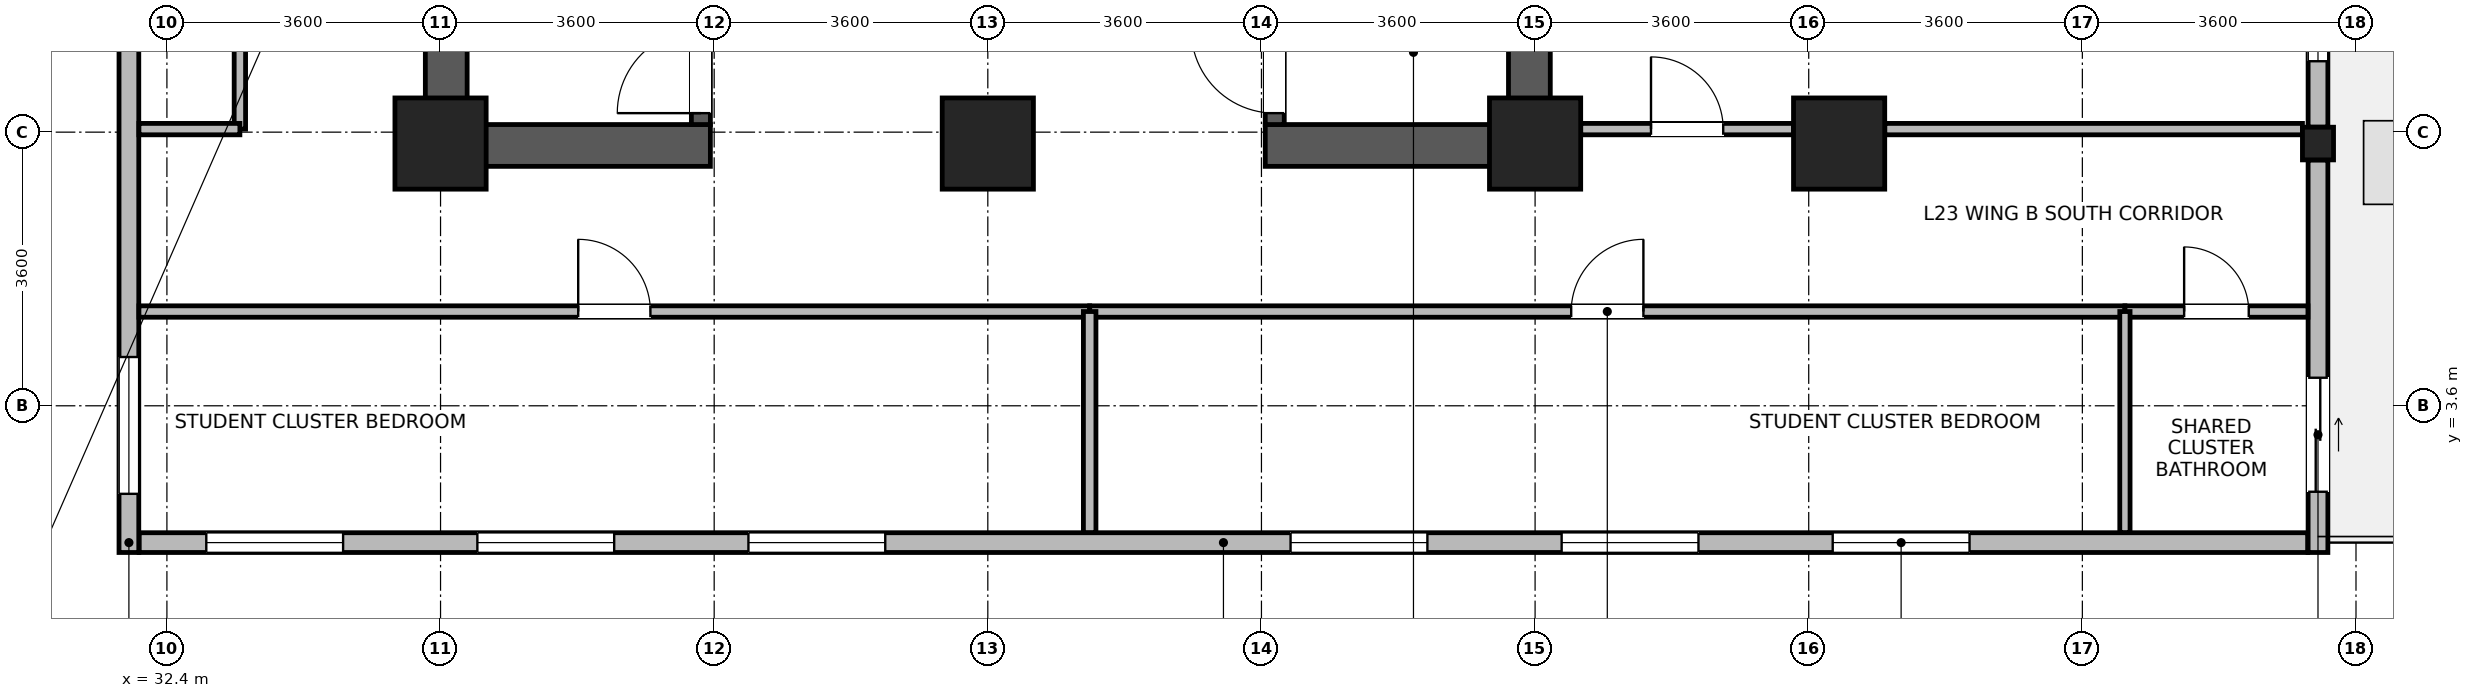
"""IFC4 building model, lengths in metres.
Left out: names, types, materials, properties, quantities, classifications, styles, units other than length and angle.
Written with IfcOpenShell. Run it as: python <this file> out.ifc"""

import sys

from ifc_helpers import new_model, si_unit, direction, frame, frame_2d, origin, origin_2d, place, context, subcontext, project, spatial, rectangle, i_section, extrude, source, transform, mapped, element, fill, save


model = new_model("IFC4")
c1 = context("Model", 3, precision=1e-05, world=origin(), true_north=direction((0.0, 1.0)))
c2 = subcontext(c1, "Body", "Model", "MODEL_VIEW")
j1 = project(units=[si_unit("LENGTHUNIT", "METRE"), si_unit("PLANEANGLEUNIT", "RADIAN")], contexts=[c1])
p1 = place(None, origin())
s1 = spatial("IfcSite", under=j1, at=p1, CompositionType="ELEMENT")
p2 = place(p1, origin())
s2 = spatial("IfcBuilding", under=s1, at=p2, CompositionType="ELEMENT")
p3 = place(p2, frame((0.0, 0.0, 93.4)))
s3 = spatial("IfcBuildingStorey", under=s2, at=p3, CompositionType="ELEMENT", Elevation=93.4)
for number, where, z_axis, x_axis in (
    (1, (36.075, 6.75, 0.0), (0.0, 0.0, 1.0), (0.0, 1.0, 0.0)),
    (2, (50.325, 6.75, 0.0), (0.0, 0.0, 1.0), (0.0, 1.0, 0.0)),
):
    element("IfcWall", number, at=place(p3, frame(where, z_axis=z_axis, x_axis=x_axis)), inside=s3, PredefinedType="SHEAR", context=c2, shape_type="SweptSolid", body=[
        extrude(rectangle(XDim=8.1, YDim=0.55, at=frame_2d((4.05, 0.0))), origin(), (0.0, 0.0, 1.0), 3.45),
    ])
for number, where, z_axis, x_axis in (
    (3, (36.35, 7.025, 0.0), (0.0, 0.0, 1.0), (1.0, 0.0, 0.0)),
    (4, (46.85, 7.025, 0.0), (0.0, 0.0, 1.0), (1.0, 0.0, 0.0)),
):
    element("IfcWall", number, at=place(p3, frame(where, z_axis=z_axis, x_axis=x_axis)), inside=s3, PredefinedType="SHEAR", context=c2, shape_type="SweptSolid", body=[
        extrude(rectangle(XDim=3.2, YDim=0.55, at=frame_2d((1.6, 0.0))), origin(), (0.0, 0.0, 1.0), 3.45),
    ])
p4 = place(p3, frame((39.425, 7.3, 0.0), z_axis=(0.0, 0.0, 1.0), x_axis=(0.0, 1.0, 0.0)))
e5 = element("IfcWall", 5, at=p4, inside=s3, PredefinedType="SHEAR", context=c2, shape_type="SweptSolid", body=[
    extrude(rectangle(XDim=7.0, YDim=0.25, at=frame_2d((3.5, 0.0))), origin(), (0.0, 0.0, 1.0), 3.45),
])
p5 = place(p4, frame((0.15, 0.0, 0.0)))
e6 = element("IfcOpeningElement", 6, at=p5, cuts=e5, PredefinedType="OPENING", context=c2, shape_type="SweptSolid", body=[
    extrude(rectangle(XDim=1.1, YDim=2.08, at=frame_2d((0.55, 1.04))), frame((0.0, 0.135, 0.0), z_axis=(0.0, -1.0, 0.0), x_axis=(1.0, 0.0, 0.0)), (0.0, 0.0, 1.0), 0.27),
])
p6 = place(p3, frame((46.975, 7.3, 0.0), z_axis=(0.0, 0.0, 1.0), x_axis=(0.0, 1.0, 0.0)))
e7 = element("IfcWall", 7, at=p6, inside=s3, PredefinedType="SHEAR", context=c2, shape_type="SweptSolid", body=[
    extrude(rectangle(XDim=7.0, YDim=0.25, at=frame_2d((3.5, 0.0))), origin(), (0.0, 0.0, 1.0), 3.45),
])
p7 = place(p6, frame((0.15, 0.0, 0.0)))
e8 = element("IfcOpeningElement", 8, at=p7, cuts=e7, PredefinedType="OPENING", context=c2, shape_type="SweptSolid", body=[
    extrude(rectangle(XDim=1.1, YDim=2.08, at=frame_2d((0.55, 1.04))), frame((0.0, 0.135, 0.0), z_axis=(0.0, -1.0, 0.0), x_axis=(1.0, 0.0, 0.0)), (0.0, 0.0, 1.0), 0.27),
])
m1 = source(origin(), c2, "Body", "SweptSolid", [
    extrude(rectangle(XDim=1.2, YDim=1.2, at=origin_2d()), origin(), (0.0, 0.0, 1.0), 3.7),
])
for number, where, z_axis, x_axis in (
    (9, (36.0, 7.05, 0.0), (0.0, 0.0, 1.0), (1.0, 0.0, 0.0)),
    (10, (43.2, 7.05, 0.0), (0.0, 0.0, 1.0), (1.0, 0.0, 0.0)),
    (11, (50.4, 7.05, 0.0), (0.0, 0.0, 1.0), (1.0, 0.0, 0.0)),
    (12, (54.4, 7.05, 0.0), (0.0, 0.0, 1.0), (1.0, 0.0, 0.0)),
):
    element("IfcColumn", number, at=place(p3, frame(where, z_axis=z_axis, x_axis=x_axis)), inside=s3, PredefinedType="COLUMN", context=c2, shape_type="MappedRepresentation", body=[
        mapped(m1, transform((0.0, 0.0, 0.0), x_axis=(1.0, 0.0, 0.0), y_axis=(0.0, 1.0, 0.0), z_axis=(0.0, 0.0, 1.0), scale=1.0)),
    ])
m2 = source(origin(), c2, "Body", "SweptSolid", [
    extrude(i_section(OverallWidth=0.409, OverallDepth=0.43, WebThickness=0.024, FlangeThickness=0.033, FilletRadius=0.015, at=origin_2d()), origin(), (0.0, 0.0, 1.0), 3.7),
])
p8 = place(p3, frame((60.7, 7.05, 0.0), z_axis=(0.0, 0.0, 1.0), x_axis=(1.0, 0.0, 0.0)))
e13 = element("IfcColumn", 13, at=p8, inside=s3, PredefinedType="COLUMN", context=c2, shape_type="MappedRepresentation", body=[
    mapped(m2, transform((0.0, 0.0, 0.0), x_axis=(1.0, 0.0, 0.0), y_axis=(0.0, 1.0, 0.0), z_axis=(0.0, 0.0, 1.0), scale=1.0)),
])
p9 = place(p3, frame((60.565, 1.8, 0.0), z_axis=(0.0, 0.0, 1.0), x_axis=(-1.0, 0.0, 0.0)))
e14 = element("IfcWall", 14, at=p9, inside=s3, PredefinedType="STANDARD", context=c2, shape_type="SweptSolid", body=[
    extrude(rectangle(XDim=28.53, YDim=0.26, at=frame_2d((14.265, 0.0))), origin(), (0.0, 0.0, 1.0), 3.43),
])
p10 = place(p9, frame((4.449, 0.0, 0.85)))
e15 = element("IfcOpeningElement", 15, at=p10, cuts=e14, PredefinedType="OPENING", context=c2, shape_type="SweptSolid", body=[
    extrude(rectangle(XDim=1.8, YDim=1.85, at=frame_2d((0.9, 0.925))), frame((0.0, 0.14, 0.0), z_axis=(0.0, -1.0, 0.0), x_axis=(1.0, 0.0, 0.0)), (0.0, 0.0, 1.0), 0.28),
])
p11 = place(p9, frame((8.016, 0.0, 0.85)))
e16 = element("IfcOpeningElement", 16, at=p11, cuts=e14, PredefinedType="OPENING", context=c2, shape_type="SweptSolid", body=[
    extrude(rectangle(XDim=1.8, YDim=1.85, at=frame_2d((0.9, 0.925))), frame((0.0, 0.14, 0.0), z_axis=(0.0, -1.0, 0.0), x_axis=(1.0, 0.0, 0.0)), (0.0, 0.0, 1.0), 0.28),
])
p12 = place(p9, frame((11.582, 0.0, 0.85)))
e17 = element("IfcOpeningElement", 17, at=p12, cuts=e14, PredefinedType="OPENING", context=c2, shape_type="SweptSolid", body=[
    extrude(rectangle(XDim=1.8, YDim=1.85, at=frame_2d((0.9, 0.925))), frame((0.0, 0.14, 0.0), z_axis=(0.0, -1.0, 0.0), x_axis=(1.0, 0.0, 0.0)), (0.0, 0.0, 1.0), 0.28),
])
p13 = place(p9, frame((18.714, 0.0, 0.85)))
e18 = element("IfcOpeningElement", 18, at=p13, cuts=e14, PredefinedType="OPENING", context=c2, shape_type="SweptSolid", body=[
    extrude(rectangle(XDim=1.8, YDim=1.85, at=frame_2d((0.9, 0.925))), frame((0.0, 0.14, 0.0), z_axis=(0.0, -1.0, 0.0), x_axis=(1.0, 0.0, 0.0)), (0.0, 0.0, 1.0), 0.28),
])
p14 = place(p9, frame((22.281, 0.0, 0.85)))
e19 = element("IfcOpeningElement", 19, at=p14, cuts=e14, PredefinedType="OPENING", context=c2, shape_type="SweptSolid", body=[
    extrude(rectangle(XDim=1.8, YDim=1.85, at=frame_2d((0.9, 0.925))), frame((0.0, 0.14, 0.0), z_axis=(0.0, -1.0, 0.0), x_axis=(1.0, 0.0, 0.0)), (0.0, 0.0, 1.0), 0.28),
])
p15 = place(p9, frame((25.847, 0.0, 0.85)))
e20 = element("IfcOpeningElement", 20, at=p15, cuts=e14, PredefinedType="OPENING", context=c2, shape_type="SweptSolid", body=[
    extrude(rectangle(XDim=1.8, YDim=1.85, at=frame_2d((0.9, 0.925))), frame((0.0, 0.14, 0.0), z_axis=(0.0, -1.0, 0.0), x_axis=(1.0, 0.0, 0.0)), (0.0, 0.0, 1.0), 0.28),
])
p16 = place(p3, frame((60.7, 6.834, 0.0), z_axis=(0.0, 0.0, 1.0), x_axis=(0.0, -1.0, 0.0)))
e21 = element("IfcWall", 21, at=p16, inside=s3, PredefinedType="STANDARD", context=c2, shape_type="SweptSolid", body=[
    extrude(rectangle(XDim=5.164, YDim=0.26, at=frame_2d((2.582, 0.0))), origin(), (0.0, 0.0, 1.0), 3.43),
])
p17 = place(p16, frame((2.865, 0.0, 0.0)))
e22 = element("IfcOpeningElement", 22, at=p17, cuts=e21, PredefinedType="OPENING", context=c2, shape_type="SweptSolid", body=[
    extrude(rectangle(XDim=1.5, YDim=2.15, at=frame_2d((0.75, 1.075))), frame((0.0, 0.14, 0.0), z_axis=(0.0, -1.0, 0.0), x_axis=(1.0, 0.0, 0.0)), (0.0, 0.0, 1.0), 0.28),
])
p18 = place(p3, frame((60.7, 14.334, 0.0), z_axis=(0.0, 0.0, 1.0), x_axis=(0.0, -1.0, 0.0)))
e23 = element("IfcWall", 23, at=p18, inside=s3, PredefinedType="STANDARD", context=c2, shape_type="SweptSolid", body=[
    extrude(rectangle(XDim=7.068, YDim=0.26, at=frame_2d((3.534, 0.0))), origin(), (0.0, 0.0, 1.0), 2.93),
])
p19 = place(p18, frame((0.867, 0.0, 0.85)))
e24 = element("IfcOpeningElement", 24, at=p19, cuts=e23, PredefinedType="OPENING", context=c2, shape_type="SweptSolid", body=[
    extrude(rectangle(XDim=1.8, YDim=1.85, at=frame_2d((0.9, 0.925))), frame((0.0, 0.14, 0.0), z_axis=(0.0, -1.0, 0.0), x_axis=(1.0, 0.0, 0.0)), (0.0, 0.0, 1.0), 0.28),
])
p20 = place(p18, frame((4.401, 0.0, 0.85)))
e25 = element("IfcOpeningElement", 25, at=p20, cuts=e23, PredefinedType="OPENING", context=c2, shape_type="SweptSolid", body=[
    extrude(rectangle(XDim=1.8, YDim=1.85, at=frame_2d((0.9, 0.925))), frame((0.0, 0.14, 0.0), z_axis=(0.0, -1.0, 0.0), x_axis=(1.0, 0.0, 0.0)), (0.0, 0.0, 1.0), 0.28),
])
p21 = place(p3, frame((31.9, 1.67, 0.0), z_axis=(0.0, 0.0, 1.0), x_axis=(0.0, 1.0, 0.0)))
e26 = element("IfcWall", 26, at=p21, inside=s3, PredefinedType="STANDARD", context=c2, shape_type="SweptSolid", body=[
    extrude(rectangle(XDim=20.06, YDim=0.26, at=frame_2d((10.03, 0.0))), origin(), (0.0, 0.0, 1.0), 3.43),
])
p22 = place(p21, frame((0.772, 0.0, 0.85)))
e27 = element("IfcOpeningElement", 27, at=p22, cuts=e26, PredefinedType="OPENING", context=c2, shape_type="SweptSolid", body=[
    extrude(rectangle(XDim=1.8, YDim=1.85, at=frame_2d((0.9, 0.925))), frame((0.0, 0.14, 0.0), z_axis=(0.0, -1.0, 0.0), x_axis=(1.0, 0.0, 0.0)), (0.0, 0.0, 1.0), 0.28),
])
p23 = place(p21, frame((7.458, 0.0, 0.85)))
e28 = element("IfcOpeningElement", 28, at=p23, cuts=e26, PredefinedType="OPENING", context=c2, shape_type="SweptSolid", body=[
    extrude(rectangle(XDim=1.8, YDim=1.85, at=frame_2d((0.9, 0.925))), frame((0.0, 0.14, 0.0), z_axis=(0.0, -1.0, 0.0), x_axis=(1.0, 0.0, 0.0)), (0.0, 0.0, 1.0), 0.28),
])
p24 = place(p21, frame((14.145, 0.0, 0.85)))
e29 = element("IfcOpeningElement", 29, at=p24, cuts=e26, PredefinedType="OPENING", context=c2, shape_type="SweptSolid", body=[
    extrude(rectangle(XDim=1.8, YDim=1.85, at=frame_2d((0.9, 0.925))), frame((0.0, 0.14, 0.0), z_axis=(0.0, -1.0, 0.0), x_axis=(1.0, 0.0, 0.0)), (0.0, 0.0, 1.0), 0.28),
])
p25 = place(p21, frame((17.488, 0.0, 0.85)))
e30 = element("IfcOpeningElement", 30, at=p25, cuts=e26, PredefinedType="OPENING", context=c2, shape_type="SweptSolid", body=[
    extrude(rectangle(XDim=1.8, YDim=1.85, at=frame_2d((0.9, 0.925))), frame((0.0, 0.14, 0.0), z_axis=(0.0, -1.0, 0.0), x_axis=(1.0, 0.0, 0.0)), (0.0, 0.0, 1.0), 0.28),
])
p26 = place(p3, frame((44.54, 4.84, 0.0), z_axis=(0.0, 0.0, 1.0), x_axis=(1.0, 0.0, 0.0)))
e31 = element("IfcWall", 31, at=p26, inside=s3, PredefinedType="PARTITIONING", context=c2, shape_type="SweptSolid", body=[
    extrude(rectangle(XDim=13.62, YDim=0.15, at=frame_2d((6.81, 0.0))), origin(), (0.0, 0.0, 1.0), 3.43),
])
p27 = place(p26, frame((6.335, 0.0, 0.0)))
e32 = element("IfcOpeningElement", 32, at=p27, cuts=e31, PredefinedType="OPENING", context=c2, shape_type="SweptSolid", body=[
    extrude(rectangle(XDim=0.95, YDim=2.1, at=frame_2d((0.475, 1.05))), frame((0.0, 0.085, 0.0), z_axis=(0.0, -1.0, 0.0), x_axis=(1.0, 0.0, 0.0)), (0.0, 0.0, 1.0), 0.17),
])
p28 = place(p3, frame((32.032, 4.84, 0.0), z_axis=(0.0, 0.0, 1.0), x_axis=(1.0, 0.0, 0.0)))
e33 = element("IfcWall", 33, at=p28, inside=s3, PredefinedType="PARTITIONING", context=c2, shape_type="SweptSolid", body=[
    extrude(rectangle(XDim=12.508, YDim=0.15, at=frame_2d((6.254, 0.0))), origin(), (0.0, 0.0, 1.0), 3.43),
])
p29 = place(p28, frame((5.779, 0.0, 0.0)))
e34 = element("IfcOpeningElement", 34, at=p29, cuts=e33, PredefinedType="OPENING", context=c2, shape_type="SweptSolid", body=[
    extrude(rectangle(XDim=0.95, YDim=2.1, at=frame_2d((0.475, 1.05))), frame((0.0, 0.085, 0.0), z_axis=(0.0, -1.0, 0.0), x_axis=(1.0, 0.0, 0.0)), (0.0, 0.0, 1.0), 0.17),
])
p30 = place(p3, frame((51.0, 7.24, 0.0), z_axis=(0.0, 0.0, 1.0), x_axis=(1.0, 0.0, 0.0)))
e35 = element("IfcWall", 35, at=p30, inside=s3, PredefinedType="PARTITIONING", context=c2, shape_type="SweptSolid", body=[
    extrude(rectangle(XDim=2.8, YDim=0.15, at=frame_2d((1.4, 0.0))), origin(), (0.0, 0.0, 1.0), 2.78),
])
p31 = place(p30, frame((0.925, 0.0, 0.0)))
e36 = element("IfcOpeningElement", 36, at=p31, cuts=e35, PredefinedType="OPENING", context=c2, shape_type="SweptSolid", body=[
    extrude(rectangle(XDim=0.95, YDim=2.1, at=frame_2d((0.475, 1.05))), frame((0.0, 0.085, 0.0), z_axis=(0.0, -1.0, 0.0), x_axis=(1.0, 0.0, 0.0)), (0.0, 0.0, 1.0), 0.17),
])
p32 = place(p3, frame((55.0, 7.24, 0.0), z_axis=(0.0, 0.0, 1.0), x_axis=(1.0, 0.0, 0.0)))
e37 = element("IfcWall", 37, at=p32, inside=s3, PredefinedType="PARTITIONING", context=c2, shape_type="SweptSolid", body=[
    extrude(rectangle(XDim=5.496, YDim=0.15, at=frame_2d((2.748, 0.0))), origin(), (0.0, 0.0, 1.0), 2.78),
])
p33 = place(p3, frame((33.36, 7.24, 0.0), z_axis=(0.0, 0.0, 1.0), x_axis=(0.0, 1.0, 0.0)))
e38 = element("IfcWall", 38, at=p33, inside=s3, PredefinedType="PARTITIONING", context=c2, shape_type="SweptSolid", body=[
    extrude(rectangle(XDim=7.26, YDim=0.15, at=frame_2d((3.63, 0.0))), origin(), (0.0, 0.0, 1.0), 3.43),
])
p34 = place(p33, frame((2.98, 0.0, 0.0)))
e39 = element("IfcOpeningElement", 39, at=p34, cuts=e38, PredefinedType="OPENING", context=c2, shape_type="SweptSolid", body=[
    extrude(rectangle(XDim=1.3, YDim=2.12, at=frame_2d((0.65, 1.06))), frame((0.0, 0.085, 0.0), z_axis=(0.0, -1.0, 0.0), x_axis=(1.0, 0.0, 0.0)), (0.0, 0.0, 1.0), 0.17),
])
p35 = place(p3, frame((58.16, 4.84, 0.0), z_axis=(0.0, 0.0, 1.0), x_axis=(1.0, 0.0, 0.0)))
e40 = element("IfcWall", 40, at=p35, inside=s3, PredefinedType="PARTITIONING", context=c2, shape_type="SweptSolid", body=[
    extrude(rectangle(XDim=2.408, YDim=0.15, at=frame_2d((1.204, 0.0))), origin(), (0.0, 0.0, 1.0), 3.43),
])
p36 = place(p35, frame((0.779, 0.0, 0.0)))
e41 = element("IfcOpeningElement", 41, at=p36, cuts=e40, PredefinedType="OPENING", context=c2, shape_type="SweptSolid", body=[
    extrude(rectangle(XDim=0.85, YDim=2.04, at=frame_2d((0.425, 1.02))), frame((0.0, 0.085, 0.0), z_axis=(0.0, -1.0, 0.0), x_axis=(1.0, 0.0, 0.0)), (0.0, 0.0, 1.0), 0.17),
])
p37 = place(p3, frame((32.032, 7.24, 0.0), z_axis=(0.0, 0.0, 1.0), x_axis=(1.0, 0.0, 0.0)))
e42 = element("IfcWall", 42, at=p37, inside=s3, PredefinedType="PARTITIONING", context=c2, shape_type="SweptSolid", body=[
    extrude(rectangle(XDim=1.328, YDim=0.15, at=frame_2d((0.664, 0.0))), origin(), (0.0, 0.0, 1.0), 3.43),
])
p38 = place(p3, frame((44.54, 1.932, 0.0), z_axis=(0.0, 0.0, 1.0), x_axis=(0.0, 1.0, 0.0)))
e43 = element("IfcWall", 43, at=p38, inside=s3, PredefinedType="PARTITIONING", context=c2, shape_type="SweptSolid", body=[
    extrude(rectangle(XDim=2.908, YDim=0.165, at=frame_2d((1.454, 0.0))), origin(), (0.0, 0.0, 1.0), 3.43),
])
p39 = place(p3, frame((58.16, 1.932, 0.0), z_axis=(0.0, 0.0, 1.0), x_axis=(0.0, 1.0, 0.0)))
e44 = element("IfcWall", 44, at=p39, inside=s3, PredefinedType="PARTITIONING", context=c2, shape_type="SweptSolid", body=[
    extrude(rectangle(XDim=2.908, YDim=0.135, at=frame_2d((1.454, 0.0))), origin(), (0.0, 0.0, 1.0), 3.43),
])
p40 = place(p10, origin())
e45 = element("IfcWindow", 45, at=p40, inside=s3, PartitioningType="SINGLE_PANEL", PredefinedType="WINDOW", context=c2, shape_type="SweptSolid", body=[
    extrude(rectangle(XDim=1.8, YDim=1.85, at=frame_2d((0.9, 0.925))), frame((0.0, 0.03, 0.0), z_axis=(0.0, -1.0, 0.0), x_axis=(1.0, 0.0, 0.0)), (0.0, 0.0, 1.0), 0.06),
])
fill(e15, e45)
p41 = place(p11, origin())
e46 = element("IfcWindow", 46, at=p41, inside=s3, PartitioningType="SINGLE_PANEL", PredefinedType="WINDOW", context=c2, shape_type="SweptSolid", body=[
    extrude(rectangle(XDim=1.8, YDim=1.85, at=frame_2d((0.9, 0.925))), frame((0.0, 0.03, 0.0), z_axis=(0.0, -1.0, 0.0), x_axis=(1.0, 0.0, 0.0)), (0.0, 0.0, 1.0), 0.06),
])
fill(e16, e46)
p42 = place(p12, origin())
e47 = element("IfcWindow", 47, at=p42, inside=s3, PartitioningType="SINGLE_PANEL", PredefinedType="WINDOW", context=c2, shape_type="SweptSolid", body=[
    extrude(rectangle(XDim=1.8, YDim=1.85, at=frame_2d((0.9, 0.925))), frame((0.0, 0.03, 0.0), z_axis=(0.0, -1.0, 0.0), x_axis=(1.0, 0.0, 0.0)), (0.0, 0.0, 1.0), 0.06),
])
fill(e17, e47)
p43 = place(p13, origin())
e48 = element("IfcWindow", 48, at=p43, inside=s3, PartitioningType="SINGLE_PANEL", PredefinedType="WINDOW", context=c2, shape_type="SweptSolid", body=[
    extrude(rectangle(XDim=1.8, YDim=1.85, at=frame_2d((0.9, 0.925))), frame((0.0, 0.03, 0.0), z_axis=(0.0, -1.0, 0.0), x_axis=(1.0, 0.0, 0.0)), (0.0, 0.0, 1.0), 0.06),
])
fill(e18, e48)
p44 = place(p14, origin())
e49 = element("IfcWindow", 49, at=p44, inside=s3, PartitioningType="SINGLE_PANEL", PredefinedType="WINDOW", context=c2, shape_type="SweptSolid", body=[
    extrude(rectangle(XDim=1.8, YDim=1.85, at=frame_2d((0.9, 0.925))), frame((0.0, 0.03, 0.0), z_axis=(0.0, -1.0, 0.0), x_axis=(1.0, 0.0, 0.0)), (0.0, 0.0, 1.0), 0.06),
])
fill(e19, e49)
p45 = place(p15, origin())
e50 = element("IfcWindow", 50, at=p45, inside=s3, PartitioningType="SINGLE_PANEL", PredefinedType="WINDOW", context=c2, shape_type="SweptSolid", body=[
    extrude(rectangle(XDim=1.8, YDim=1.85, at=frame_2d((0.9, 0.925))), frame((0.0, 0.03, 0.0), z_axis=(0.0, -1.0, 0.0), x_axis=(1.0, 0.0, 0.0)), (0.0, 0.0, 1.0), 0.06),
])
fill(e20, e50)
p46 = place(p17, origin())
e51 = element("IfcDoor", 51, at=p46, inside=s3, OperationType="SLIDING_TO_LEFT", PredefinedType="DOOR", context=c2, shape_type="SweptSolid", body=[
    extrude(rectangle(XDim=1.5, YDim=2.15, at=frame_2d((0.75, 1.075))), frame((0.0, 0.025, 0.0), z_axis=(0.0, -1.0, 0.0), x_axis=(1.0, 0.0, 0.0)), (0.0, 0.0, 1.0), 0.05),
])
fill(e22, e51)
p47 = place(p20, origin())
e52 = element("IfcWindow", 52, at=p47, inside=s3, PartitioningType="SINGLE_PANEL", PredefinedType="WINDOW", context=c2, shape_type="SweptSolid", body=[
    extrude(rectangle(XDim=1.8, YDim=1.85, at=frame_2d((0.9, 0.925))), frame((0.0, 0.03, 0.0), z_axis=(0.0, -1.0, 0.0), x_axis=(1.0, 0.0, 0.0)), (0.0, 0.0, 1.0), 0.06),
])
fill(e25, e52)
p48 = place(p22, origin())
e53 = element("IfcWindow", 53, at=p48, inside=s3, PartitioningType="SINGLE_PANEL", PredefinedType="WINDOW", context=c2, shape_type="SweptSolid", body=[
    extrude(rectangle(XDim=1.8, YDim=1.85, at=frame_2d((0.9, 0.925))), frame((0.0, 0.03, 0.0), z_axis=(0.0, -1.0, 0.0), x_axis=(1.0, 0.0, 0.0)), (0.0, 0.0, 1.0), 0.06),
])
fill(e27, e53)
p49 = place(p5, origin())
e54 = element("IfcDoor", 54, at=p49, inside=s3, OperationType="SINGLE_SWING_LEFT", PredefinedType="DOOR", context=c2, shape_type="SweptSolid", body=[
    extrude(rectangle(XDim=1.1, YDim=2.08, at=frame_2d((0.55, 1.04))), frame((0.0, 0.025, 0.0), z_axis=(0.0, -1.0, 0.0), x_axis=(1.0, 0.0, 0.0)), (0.0, 0.0, 1.0), 0.05),
])
fill(e6, e54)
p50 = place(p7, origin())
e55 = element("IfcDoor", 55, at=p50, inside=s3, OperationType="SINGLE_SWING_RIGHT", PredefinedType="DOOR", context=c2, shape_type="SweptSolid", body=[
    extrude(rectangle(XDim=1.1, YDim=2.08, at=frame_2d((0.55, 1.04))), frame((0.0, 0.025, 0.0), z_axis=(0.0, -1.0, 0.0), x_axis=(1.0, 0.0, 0.0)), (0.0, 0.0, 1.0), 0.05),
])
fill(e8, e55)
p51 = place(p27, origin())
e56 = element("IfcDoor", 56, at=p51, inside=s3, OperationType="SINGLE_SWING_RIGHT", PredefinedType="DOOR", context=c2, shape_type="SweptSolid", body=[
    extrude(rectangle(XDim=0.95, YDim=2.1, at=frame_2d((0.475, 1.05))), frame((0.0, 0.025, 0.0), z_axis=(0.0, -1.0, 0.0), x_axis=(1.0, 0.0, 0.0)), (0.0, 0.0, 1.0), 0.05),
])
fill(e32, e56)
p52 = place(p29, origin())
e57 = element("IfcDoor", 57, at=p52, inside=s3, OperationType="SINGLE_SWING_LEFT", PredefinedType="DOOR", context=c2, shape_type="SweptSolid", body=[
    extrude(rectangle(XDim=0.95, YDim=2.1, at=frame_2d((0.475, 1.05))), frame((0.0, 0.025, 0.0), z_axis=(0.0, -1.0, 0.0), x_axis=(1.0, 0.0, 0.0)), (0.0, 0.0, 1.0), 0.05),
])
fill(e34, e57)
p53 = place(p31, origin())
e58 = element("IfcDoor", 58, at=p53, inside=s3, OperationType="SINGLE_SWING_LEFT", PredefinedType="DOOR", context=c2, shape_type="SweptSolid", body=[
    extrude(rectangle(XDim=0.95, YDim=2.1, at=frame_2d((0.475, 1.05))), frame((0.0, 0.025, 0.0), z_axis=(0.0, -1.0, 0.0), x_axis=(1.0, 0.0, 0.0)), (0.0, 0.0, 1.0), 0.05),
])
fill(e36, e58)
p54 = place(p36, origin())
e59 = element("IfcDoor", 59, at=p54, inside=s3, OperationType="SINGLE_SWING_LEFT", PredefinedType="DOOR", context=c2, shape_type="SweptSolid", body=[
    extrude(rectangle(XDim=0.85, YDim=2.04, at=frame_2d((0.425, 1.02))), frame((0.0, 0.025, 0.0), z_axis=(0.0, -1.0, 0.0), x_axis=(1.0, 0.0, 0.0)), (0.0, 0.0, 1.0), 0.05),
])
fill(e41, e59)
save(model, sys.argv[1])
